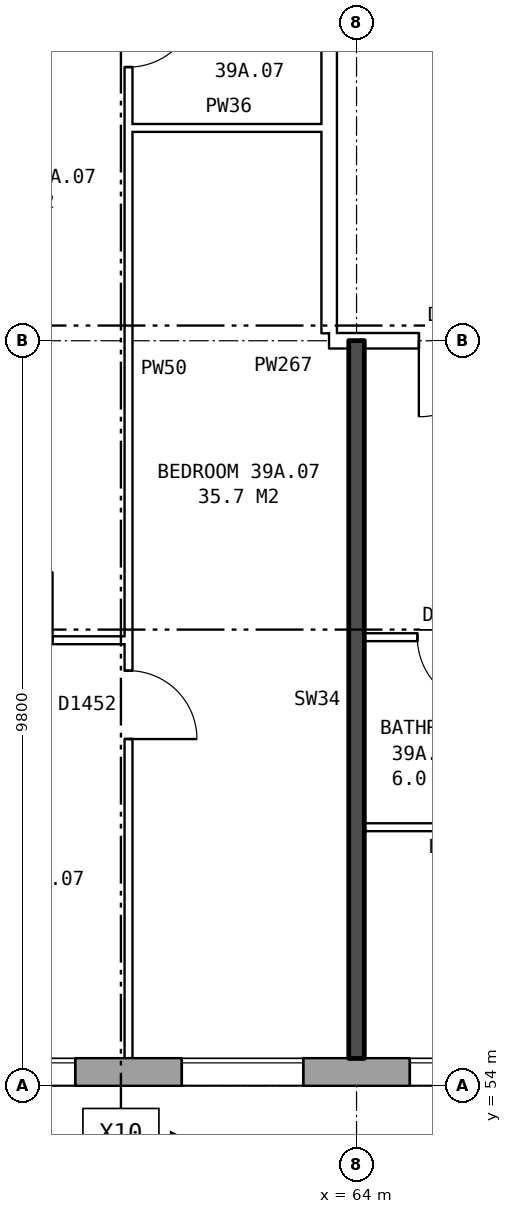
"""IFC4 building model, lengths in metres.
Left out: names, types, materials, properties, quantities, classifications, styles, units other than length and angle.
Written with IfcOpenShell. Run it as: python <this file> out.ifc"""

import sys

from ifc_helpers import new_model, si_unit, direction, frame, frame_2d, origin, place, context, subcontext, project, spatial, rectangle, extrude, element, fill, save


model = new_model("IFC4")
c1 = context("Model", 3, precision=1e-05, world=origin(), true_north=direction((0.0, 1.0)))
c2 = subcontext(c1, "Body", "Model", "MODEL_VIEW")
j1 = project(units=[si_unit("LENGTHUNIT", "METRE"), si_unit("PLANEANGLEUNIT", "RADIAN")], contexts=[c1])
p1 = place(None, origin())
s1 = spatial("IfcSite", under=j1, at=p1, CompositionType="ELEMENT")
p2 = place(p1, origin())
s2 = spatial("IfcBuilding", under=s1, at=p2, CompositionType="ELEMENT")
p3 = place(p2, frame((0.0, 0.0, 139.2)))
s3 = spatial("IfcBuildingStorey", under=s2, at=p3, CompositionType="ELEMENT", Elevation=139.2)
p4 = place(p3, frame((29.825, 54.18, 0.0), z_axis=(0.0, 0.0, 1.0), x_axis=(1.0, 0.0, 0.0)))
e1 = element("IfcWall", 1, at=p4, inside=s3, PredefinedType="STANDARD", context=c2, shape_type="SweptSolid", body=[
    extrude(rectangle(XDim=43.101, YDim=0.36, at=frame_2d((21.55, 0.0))), origin(), (0.0, 0.0, 1.0), 2.85),
])
p5 = place(p4, frame((1.875, 0.0, 0.8)))
e2 = element("IfcOpeningElement", 2, at=p5, cuts=e1, PredefinedType="OPENING", context=c2, shape_type="SweptSolid", body=[
    extrude(rectangle(XDim=1.6, YDim=1.8, at=frame_2d((0.8, 0.9))), frame((0.0, 0.19, 0.0), z_axis=(0.0, -1.0, 0.0), x_axis=(1.0, 0.0, 0.0)), (0.0, 0.0, 1.0), 0.38),
])
p6 = place(p4, frame((4.875, 0.0, 0.8)))
e3 = element("IfcOpeningElement", 3, at=p6, cuts=e1, PredefinedType="OPENING", context=c2, shape_type="SweptSolid", body=[
    extrude(rectangle(XDim=1.6, YDim=1.8, at=frame_2d((0.8, 0.9))), frame((0.0, 0.19, 0.0), z_axis=(0.0, -1.0, 0.0), x_axis=(1.0, 0.0, 0.0)), (0.0, 0.0, 1.0), 0.38),
])
p7 = place(p4, frame((7.875, 0.0, 0.8)))
e4 = element("IfcOpeningElement", 4, at=p7, cuts=e1, PredefinedType="OPENING", context=c2, shape_type="SweptSolid", body=[
    extrude(rectangle(XDim=1.6, YDim=1.8, at=frame_2d((0.8, 0.9))), frame((0.0, 0.19, 0.0), z_axis=(0.0, -1.0, 0.0), x_axis=(1.0, 0.0, 0.0)), (0.0, 0.0, 1.0), 0.38),
])
p8 = place(p4, frame((10.875, 0.0, 0.8)))
e5 = element("IfcOpeningElement", 5, at=p8, cuts=e1, PredefinedType="OPENING", context=c2, shape_type="SweptSolid", body=[
    extrude(rectangle(XDim=1.6, YDim=1.8, at=frame_2d((0.8, 0.9))), frame((0.0, 0.19, 0.0), z_axis=(0.0, -1.0, 0.0), x_axis=(1.0, 0.0, 0.0)), (0.0, 0.0, 1.0), 0.38),
])
p9 = place(p4, frame((13.875, 0.0, 0.8)))
e6 = element("IfcOpeningElement", 6, at=p9, cuts=e1, PredefinedType="OPENING", context=c2, shape_type="SweptSolid", body=[
    extrude(rectangle(XDim=1.6, YDim=1.8, at=frame_2d((0.8, 0.9))), frame((0.0, 0.19, 0.0), z_axis=(0.0, -1.0, 0.0), x_axis=(1.0, 0.0, 0.0)), (0.0, 0.0, 1.0), 0.38),
])
p10 = place(p4, frame((16.875, 0.0, 0.8)))
e7 = element("IfcOpeningElement", 7, at=p10, cuts=e1, PredefinedType="OPENING", context=c2, shape_type="SweptSolid", body=[
    extrude(rectangle(XDim=1.6, YDim=1.8, at=frame_2d((0.8, 0.9))), frame((0.0, 0.19, 0.0), z_axis=(0.0, -1.0, 0.0), x_axis=(1.0, 0.0, 0.0)), (0.0, 0.0, 1.0), 0.38),
])
p11 = place(p4, frame((20.975, 0.0, 0.15)))
e8 = element("IfcOpeningElement", 8, at=p11, cuts=e1, PredefinedType="OPENING", context=c2, shape_type="SweptSolid", body=[
    extrude(rectangle(XDim=1.0, YDim=1.5, at=frame_2d((0.5, 0.75))), frame((0.0, 0.19, 0.0), z_axis=(0.0, -1.0, 0.0), x_axis=(1.0, 0.0, 0.0)), (0.0, 0.0, 1.0), 0.38),
])
p12 = place(p4, frame((23.225, 0.0, 1.7)))
e9 = element("IfcOpeningElement", 9, at=p12, cuts=e1, PredefinedType="OPENING", context=c2, shape_type="SweptSolid", body=[
    extrude(rectangle(XDim=0.6, YDim=0.9, at=frame_2d((0.3, 0.45))), frame((0.0, 0.19, 0.0), z_axis=(0.0, -1.0, 0.0), x_axis=(1.0, 0.0, 0.0)), (0.0, 0.0, 1.0), 0.38),
])
p13 = place(p4, frame((25.875, 0.0, 0.8)))
e10 = element("IfcOpeningElement", 10, at=p13, cuts=e1, PredefinedType="OPENING", context=c2, shape_type="SweptSolid", body=[
    extrude(rectangle(XDim=1.6, YDim=1.8, at=frame_2d((0.8, 0.9))), frame((0.0, 0.19, 0.0), z_axis=(0.0, -1.0, 0.0), x_axis=(1.0, 0.0, 0.0)), (0.0, 0.0, 1.0), 0.38),
])
p14 = place(p4, frame((28.875, 0.0, 0.8)))
e11 = element("IfcOpeningElement", 11, at=p14, cuts=e1, PredefinedType="OPENING", context=c2, shape_type="SweptSolid", body=[
    extrude(rectangle(XDim=1.6, YDim=1.8, at=frame_2d((0.8, 0.9))), frame((0.0, 0.19, 0.0), z_axis=(0.0, -1.0, 0.0), x_axis=(1.0, 0.0, 0.0)), (0.0, 0.0, 1.0), 0.38),
])
p15 = place(p4, frame((31.875, 0.0, 0.8)))
e12 = element("IfcOpeningElement", 12, at=p15, cuts=e1, PredefinedType="OPENING", context=c2, shape_type="SweptSolid", body=[
    extrude(rectangle(XDim=1.6, YDim=1.8, at=frame_2d((0.8, 0.9))), frame((0.0, 0.19, 0.0), z_axis=(0.0, -1.0, 0.0), x_axis=(1.0, 0.0, 0.0)), (0.0, 0.0, 1.0), 0.38),
])
p16 = place(p4, frame((34.875, 0.0, 0.8)))
e13 = element("IfcOpeningElement", 13, at=p16, cuts=e1, PredefinedType="OPENING", context=c2, shape_type="SweptSolid", body=[
    extrude(rectangle(XDim=1.6, YDim=1.8, at=frame_2d((0.8, 0.9))), frame((0.0, 0.19, 0.0), z_axis=(0.0, -1.0, 0.0), x_axis=(1.0, 0.0, 0.0)), (0.0, 0.0, 1.0), 0.38),
])
p17 = place(p4, frame((37.875, 0.0, 0.8)))
e14 = element("IfcOpeningElement", 14, at=p17, cuts=e1, PredefinedType="OPENING", context=c2, shape_type="SweptSolid", body=[
    extrude(rectangle(XDim=1.6, YDim=1.8, at=frame_2d((0.8, 0.9))), frame((0.0, 0.19, 0.0), z_axis=(0.0, -1.0, 0.0), x_axis=(1.0, 0.0, 0.0)), (0.0, 0.0, 1.0), 0.38),
])
p18 = place(p4, frame((40.875, 0.0, 0.8)))
e15 = element("IfcOpeningElement", 15, at=p18, cuts=e1, PredefinedType="OPENING", context=c2, shape_type="SweptSolid", body=[
    extrude(rectangle(XDim=1.6, YDim=1.8, at=frame_2d((0.8, 0.9))), frame((0.0, 0.19, 0.0), z_axis=(0.0, -1.0, 0.0), x_axis=(1.0, 0.0, 0.0)), (0.0, 0.0, 1.0), 0.38),
])
p19 = place(p4, frame((24.225, 0.0, 0.8)))
e16 = element("IfcOpeningElement", 16, at=p19, cuts=e1, PredefinedType="OPENING", context=c2, shape_type="SweptSolid", body=[
    extrude(rectangle(XDim=0.8, YDim=1.8, at=frame_2d((0.4, 0.9))), frame((0.0, 0.19, 0.0), z_axis=(0.0, -1.0, 0.0), x_axis=(1.0, 0.0, 0.0)), (0.0, 0.0, 1.0), 0.38),
])
p20 = place(p3, frame((63.64, 63.9, 0.0), z_axis=(0.0, 0.0, 1.0), x_axis=(0.0, 1.0, 0.0)))
e17 = element("IfcWall", 17, at=p20, inside=s3, PredefinedType="PARTITIONING", context=c2, shape_type="SweptSolid", body=[
    extrude(rectangle(XDim=12.2, YDim=0.2, at=frame_2d((6.1, 0.0))), origin(), (0.0, 0.0, 1.0), 2.85),
])
p21 = place(p20, frame((5.1, 0.0, 0.0)))
e18 = element("IfcOpeningElement", 18, at=p21, cuts=e17, PredefinedType="OPENING", context=c2, shape_type="SweptSolid", body=[
    extrude(rectangle(XDim=2.0, YDim=2.1, at=frame_2d((1.0, 1.05))), frame((0.0, 0.11, 0.0), z_axis=(0.0, -1.0, 0.0), x_axis=(1.0, 0.0, 0.0)), (0.0, 0.0, 1.0), 0.22),
])
p22 = place(p3, frame((64.1, 57.4, 0.0), z_axis=(0.0, 0.0, 1.0), x_axis=(1.0, 0.0, 0.0)))
e19 = element("IfcWall", 19, at=p22, inside=s3, PredefinedType="PARTITIONING", context=c2, shape_type="SweptSolid", body=[
    extrude(rectangle(XDim=2.3, YDim=0.1, at=frame_2d((1.15, 0.0))), origin(), (0.0, 0.0, 1.0), 2.85),
])
p23 = place(p3, frame((58.1, 59.86, 0.0), z_axis=(0.0, 0.0, 1.0), x_axis=(1.0, 0.0, 0.0)))
e20 = element("IfcWall", 20, at=p23, inside=s3, PredefinedType="PARTITIONING", context=c2, shape_type="SweptSolid", body=[
    extrude(rectangle(XDim=2.9, YDim=0.1, at=frame_2d((1.45, 0.0))), origin(), (0.0, 0.0, 1.0), 2.85),
])
p24 = place(p23, frame((1.0, 0.0, 0.0)))
e21 = element("IfcOpeningElement", 21, at=p24, cuts=e20, PredefinedType="OPENING", context=c2, shape_type="SweptSolid", body=[
    extrude(rectangle(XDim=0.9, YDim=2.1, at=frame_2d((0.45, 1.05))), frame((0.0, 0.06, 0.0), z_axis=(0.0, -1.0, 0.0), x_axis=(1.0, 0.0, 0.0)), (0.0, 0.0, 1.0), 0.12),
])
p25 = place(p3, frame((64.1, 59.9, 0.0), z_axis=(0.0, 0.0, 1.0), x_axis=(1.0, 0.0, 0.0)))
e22 = element("IfcWall", 22, at=p25, inside=s3, PredefinedType="PARTITIONING", context=c2, shape_type="SweptSolid", body=[
    extrude(rectangle(XDim=5.8, YDim=0.1, at=frame_2d((2.9, 0.0))), origin(), (0.0, 0.0, 1.0), 2.85),
])
p26 = place(p25, frame((3.6, 0.0, 0.0)))
e23 = element("IfcOpeningElement", 23, at=p26, cuts=e22, PredefinedType="OPENING", context=c2, shape_type="SweptSolid", body=[
    extrude(rectangle(XDim=0.9, YDim=2.1, at=frame_2d((0.45, 1.05))), frame((0.0, 0.06, 0.0), z_axis=(0.0, -1.0, 0.0), x_axis=(1.0, 0.0, 0.0)), (0.0, 0.0, 1.0), 0.12),
])
p27 = place(p25, frame((0.7, 0.0, 0.0)))
e24 = element("IfcOpeningElement", 24, at=p27, cuts=e22, PredefinedType="OPENING", context=c2, shape_type="SweptSolid", body=[
    extrude(rectangle(XDim=0.9, YDim=2.1, at=frame_2d((0.45, 1.05))), frame((0.0, 0.06, 0.0), z_axis=(0.0, -1.0, 0.0), x_axis=(1.0, 0.0, 0.0)), (0.0, 0.0, 1.0), 0.12),
])
p28 = place(p3, frame((63.64, 63.8, 0.0), z_axis=(0.0, 0.0, 1.0), x_axis=(1.0, 0.0, 0.0)))
e25 = element("IfcWall", 25, at=p28, inside=s3, PredefinedType="PARTITIONING", context=c2, shape_type="SweptSolid", body=[
    extrude(rectangle(XDim=3.0, YDim=0.2, at=frame_2d((1.5, 0.0))), origin(), (0.0, 0.0, 1.0), 2.85),
])
p29 = place(p28, frame((1.18, 0.0, 0.0)))
e26 = element("IfcOpeningElement", 26, at=p29, cuts=e25, PredefinedType="OPENING", context=c2, shape_type="SweptSolid", body=[
    extrude(rectangle(XDim=1.0, YDim=2.1, at=frame_2d((0.5, 1.05))), frame((0.0, 0.11, 0.0), z_axis=(0.0, -1.0, 0.0), x_axis=(1.0, 0.0, 0.0)), (0.0, 0.0, 1.0), 0.22),
])
p30 = place(p3, frame((61.0, 66.6, 0.0), z_axis=(0.0, 0.0, 1.0), x_axis=(1.0, 0.0, 0.0)))
e27 = element("IfcWall", 27, at=p30, inside=s3, PredefinedType="PARTITIONING", context=c2, shape_type="SweptSolid", body=[
    extrude(rectangle(XDim=2.64, YDim=0.1, at=frame_2d((1.32, 0.0))), origin(), (0.0, 0.0, 1.0), 2.85),
])
p31 = place(p3, frame((61.0, 54.36, 0.0), z_axis=(0.0, 0.0, 1.0), x_axis=(0.0, 1.0, 0.0)))
e28 = element("IfcWall", 28, at=p31, inside=s3, PredefinedType="PARTITIONING", context=c2, shape_type="SweptSolid", body=[
    extrude(rectangle(XDim=14.34, YDim=0.1, at=frame_2d((7.17, 0.0))), origin(), (0.0, 0.0, 1.0), 2.85),
])
p32 = place(p31, frame((4.2, 0.0, 0.0)))
e29 = element("IfcOpeningElement", 29, at=p32, cuts=e28, PredefinedType="OPENING", context=c2, shape_type="SweptSolid", body=[
    extrude(rectangle(XDim=0.9, YDim=2.1, at=frame_2d((0.45, 1.05))), frame((0.0, 0.06, 0.0), z_axis=(0.0, -1.0, 0.0), x_axis=(1.0, 0.0, 0.0)), (0.0, 0.0, 1.0), 0.12),
])
p33 = place(p31, frame((13.04, 0.0, 0.0)))
e30 = element("IfcOpeningElement", 30, at=p33, cuts=e28, PredefinedType="OPENING", context=c2, shape_type="SweptSolid", body=[
    extrude(rectangle(XDim=0.9, YDim=2.1, at=frame_2d((0.45, 1.05))), frame((0.0, 0.06, 0.0), z_axis=(0.0, -1.0, 0.0), x_axis=(1.0, 0.0, 0.0)), (0.0, 0.0, 1.0), 0.12),
])
p34 = place(p3, frame((64.0, 54.36, 0.0), z_axis=(0.0, 0.0, 1.0), x_axis=(0.0, 1.0, 0.0)))
e31 = element("IfcWall", 31, at=p34, inside=s3, PredefinedType="SOLIDWALL", context=c2, shape_type="SweptSolid", body=[
    extrude(rectangle(XDim=9.44, YDim=0.2, at=frame_2d((4.72, 0.0))), origin(), (0.0, 0.0, 1.0), 2.85),
])
p35 = place(p14, origin())
e32 = element("IfcWindow", 32, at=p35, inside=s3, PartitioningType="SINGLE_PANEL", PredefinedType="WINDOW", context=c2, shape_type="SweptSolid", body=[
    extrude(rectangle(XDim=1.6, YDim=1.8, at=frame_2d((0.8, 0.9))), frame((0.0, 0.15, 0.0), z_axis=(0.0, -1.0, 0.0), x_axis=(1.0, 0.0, 0.0)), (0.0, 0.0, 1.0), 0.06),
])
fill(e11, e32)
p36 = place(p15, origin())
e33 = element("IfcWindow", 33, at=p36, inside=s3, PartitioningType="SINGLE_PANEL", PredefinedType="WINDOW", context=c2, shape_type="SweptSolid", body=[
    extrude(rectangle(XDim=1.6, YDim=1.8, at=frame_2d((0.8, 0.9))), frame((0.0, 0.15, 0.0), z_axis=(0.0, -1.0, 0.0), x_axis=(1.0, 0.0, 0.0)), (0.0, 0.0, 1.0), 0.06),
])
fill(e12, e33)
p37 = place(p16, origin())
e34 = element("IfcWindow", 34, at=p37, inside=s3, PartitioningType="SINGLE_PANEL", PredefinedType="WINDOW", context=c2, shape_type="SweptSolid", body=[
    extrude(rectangle(XDim=1.6, YDim=1.8, at=frame_2d((0.8, 0.9))), frame((0.0, 0.15, 0.0), z_axis=(0.0, -1.0, 0.0), x_axis=(1.0, 0.0, 0.0)), (0.0, 0.0, 1.0), 0.06),
])
fill(e13, e34)
p38 = place(p29, frame((1.0, 0.0, 0.0), z_axis=(0.0, 0.0, 1.0), x_axis=(-1.0, 0.0, 0.0)))
e35 = element("IfcDoor", 35, at=p38, inside=s3, OperationType="SINGLE_SWING_RIGHT", PredefinedType="DOOR", context=c2, shape_type="SweptSolid", body=[
    extrude(rectangle(XDim=1.0, YDim=2.1, at=frame_2d((0.5, 1.05))), frame((0.0, 0.025, 0.0), z_axis=(0.0, -1.0, 0.0), x_axis=(1.0, 0.0, 0.0)), (0.0, 0.0, 1.0), 0.05),
])
fill(e26, e35)
p39 = place(p27, frame((0.9, 0.0, 0.0), z_axis=(0.0, 0.0, 1.0), x_axis=(-1.0, 0.0, 0.0)))
e36 = element("IfcDoor", 36, at=p39, inside=s3, OperationType="SINGLE_SWING_LEFT", PredefinedType="DOOR", context=c2, shape_type="SweptSolid", body=[
    extrude(rectangle(XDim=0.9, YDim=2.1, at=frame_2d((0.45, 1.05))), frame((0.0, 0.025, 0.0), z_axis=(0.0, -1.0, 0.0), x_axis=(1.0, 0.0, 0.0)), (0.0, 0.0, 1.0), 0.05),
])
fill(e24, e36)
p40 = place(p32, frame((0.9, 0.0, 0.0), z_axis=(0.0, 0.0, 1.0), x_axis=(-1.0, 0.0, 0.0)))
e37 = element("IfcDoor", 37, at=p40, inside=s3, OperationType="SINGLE_SWING_RIGHT", PredefinedType="DOOR", context=c2, shape_type="SweptSolid", body=[
    extrude(rectangle(XDim=0.9, YDim=2.1, at=frame_2d((0.45, 1.05))), frame((0.0, 0.025, 0.0), z_axis=(0.0, -1.0, 0.0), x_axis=(1.0, 0.0, 0.0)), (0.0, 0.0, 1.0), 0.05),
])
fill(e29, e37)
p41 = place(p33, frame((0.9, 0.0, 0.0), z_axis=(0.0, 0.0, 1.0), x_axis=(-1.0, 0.0, 0.0)))
e38 = element("IfcDoor", 38, at=p41, inside=s3, OperationType="SINGLE_SWING_LEFT", PredefinedType="DOOR", context=c2, shape_type="SweptSolid", body=[
    extrude(rectangle(XDim=0.9, YDim=2.1, at=frame_2d((0.45, 1.05))), frame((0.0, 0.025, 0.0), z_axis=(0.0, -1.0, 0.0), x_axis=(1.0, 0.0, 0.0)), (0.0, 0.0, 1.0), 0.05),
])
fill(e30, e38)
save(model, sys.argv[1])
